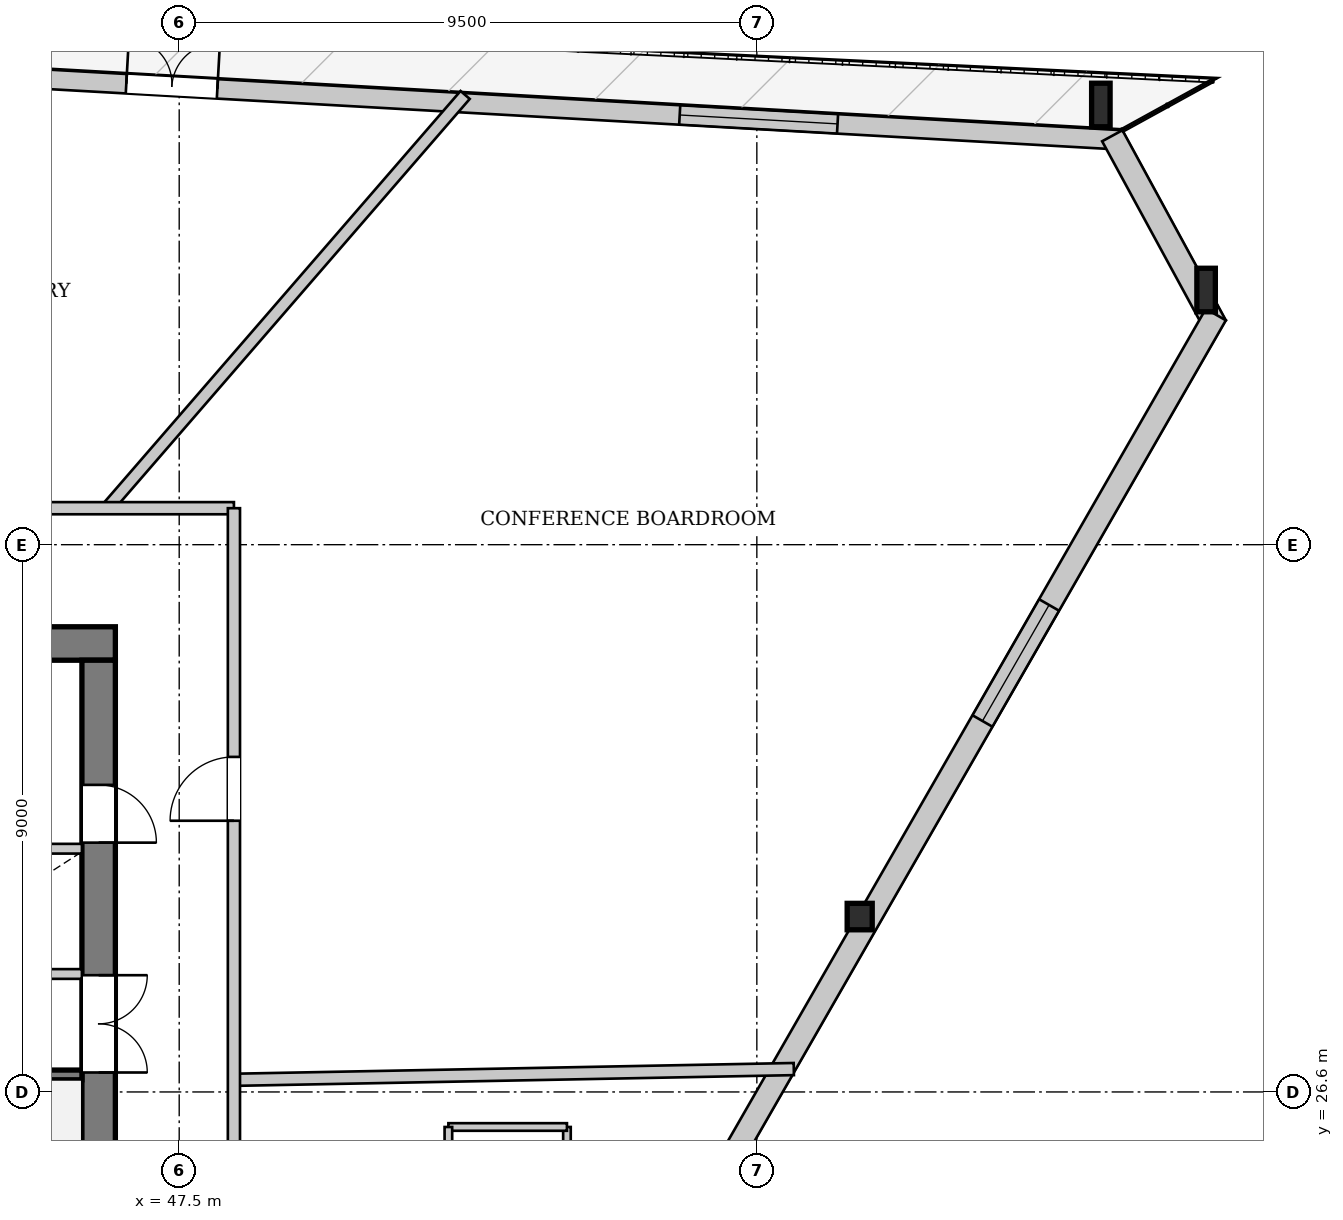
"""IFC4 building model, lengths in metres.
Left out: names, types, materials, properties, quantities, classifications, styles, units other than length and angle.
Written with IfcOpenShell. Run it as: python <this file> out.ifc"""

import sys

from ifc_helpers import new_model, si_unit, direction, frame, frame_2d, origin, origin_2d, place, context, subcontext, project, spatial, rectangle, i_section, extrude, source, transform, mapped, element, fill, save


model = new_model("IFC4")
c1 = context("Model", 3, precision=1e-05, world=origin(), true_north=direction((0.0, 1.0)))
c2 = subcontext(c1, "Body", "Model", "MODEL_VIEW")
j1 = project(units=[si_unit("LENGTHUNIT", "METRE"), si_unit("PLANEANGLEUNIT", "RADIAN")], contexts=[c1])
p1 = place(None, origin())
s1 = spatial("IfcSite", under=j1, at=p1, CompositionType="ELEMENT")
p2 = place(p1, origin())
s2 = spatial("IfcBuilding", under=s1, at=p2, CompositionType="ELEMENT")
p3 = place(p2, frame((0.0, 0.0, 157.25)))
s3 = spatial("IfcBuildingStorey", under=s2, at=p3, CompositionType="ELEMENT", Elevation=157.25)
m1 = source(origin(), c2, "Body", "SweptSolid", [
    extrude(i_section(OverallWidth=0.304, OverallDepth=0.716, WebThickness=0.021, FlangeThickness=0.04, at=origin_2d()), origin(), (0.0, 0.0, 1.0), 3.588),
])
p4 = place(p3, frame((64.713, 39.29, 0.0), z_axis=(-0.180999901235, 0.277759998813, 0.943444973919), x_axis=(-0.837814695631, -0.54595470122, 0.0)))
e1 = element("IfcColumn", 1, at=p4, inside=s3, PredefinedType="COLUMN", context=c2, shape_type="MappedRepresentation", body=[
    mapped(m1, transform((0.0, 0.0, 0.0), x_axis=(1.0, 0.0, 0.0), y_axis=(0.0, 1.0, 0.0), z_axis=(0.0, 0.0, 1.0), scale=1.0)),
])
m2 = source(origin(), c2, "Body", "SweptSolid", [
    extrude(i_section(OverallWidth=0.304, OverallDepth=0.716, WebThickness=0.021, FlangeThickness=0.04, at=origin_2d()), origin(), (0.0, 0.0, 1.0), 3.557),
])
p5 = place(p3, frame((63.012, 42.416, 0.0), z_axis=(-0.199467388464, 0.233444111551, 0.951691445649), x_axis=(-0.76026557105, -0.649612393259, 0.0)))
e2 = element("IfcColumn", 2, at=p5, inside=s3, PredefinedType="COLUMN", context=c2, shape_type="MappedRepresentation", body=[
    mapped(m2, transform((0.0, 0.0, 0.0), x_axis=(1.0, 0.0, 0.0), y_axis=(0.0, 1.0, 0.0), z_axis=(0.0, 0.0, 1.0), scale=1.0)),
])
m3 = source(origin(), c2, "Body", "SweptSolid", [
    extrude(i_section(OverallWidth=0.412, OverallDepth=0.435, WebThickness=0.031, FlangeThickness=0.05, at=origin_2d()), origin(), (0.0, 0.0, 1.0), 3.503),
])
p6 = place(p3, frame((58.838, 29.058, 0.0), z_axis=(-0.083352807672, 0.243576975596, 0.966293209338), x_axis=(-0.946135617904, -0.32377058627, 0.0)))
e3 = element("IfcColumn", 3, at=p6, inside=s3, PredefinedType="COLUMN", context=c2, shape_type="MappedRepresentation", body=[
    mapped(m3, transform((0.0, 0.0, 0.0), x_axis=(1.0, 0.0, 0.0), y_axis=(0.0, 1.0, 0.0), z_axis=(0.0, 0.0, 1.0), scale=1.0)),
])
p7 = place(p3, frame((40.027, 43.553, 0.0), z_axis=(0.0, 0.0, 1.0), x_axis=(0.998410901797, -0.056353093731, 0.0)))
e4 = element("IfcWall", 4, at=p7, inside=s3, PredefinedType="SOLIDWALL", context=c2, shape_type="SweptSolid", body=[
    extrude(rectangle(XDim=23.013, YDim=0.32, at=frame_2d((11.507, 0.0))), origin(), (0.0, 0.0, 1.0), 2.722),
])
p8 = place(p7, frame((6.614, 0.0, 0.0)))
e5 = element("IfcOpeningElement", 5, at=p8, cuts=e4, PredefinedType="OPENING", context=c2, shape_type="SweptSolid", body=[
    extrude(rectangle(XDim=1.5, YDim=2.3, at=frame_2d((0.75, 1.15))), frame((0.0, 0.17, 0.0), z_axis=(0.0, -1.0, 0.0), x_axis=(1.0, 0.0, 0.0)), (0.0, 0.0, 1.0), 0.34),
])
p9 = place(p7, frame((15.73, 0.0, 0.252)))
e6 = element("IfcOpeningElement", 6, at=p9, cuts=e4, PredefinedType="OPENING", context=c2, shape_type="SweptSolid", body=[
    extrude(rectangle(XDim=2.6, YDim=2.35, at=frame_2d((1.3, 1.175))), frame((0.0, 0.17, 0.0), z_axis=(0.0, -1.0, 0.0), x_axis=(1.0, 0.0, 0.0)), (0.0, 0.0, 1.0), 0.34),
])
p10 = place(p3, frame((62.846, 42.325, 0.0), z_axis=(0.0, 0.0, 1.0), x_axis=(0.477924257252, -0.878401049823, 0.0)))
e7 = element("IfcWall", 7, at=p10, inside=s3, PredefinedType="SOLIDWALL", context=c2, shape_type="SweptSolid", body=[
    extrude(rectangle(XDim=3.559, YDim=0.38, at=frame_2d((1.78, 0.0))), origin(), (0.0, 0.0, 1.0), 2.722),
])
p11 = place(p3, frame((64.549, 39.384, 0.0), z_axis=(0.0, 0.0, 1.0), x_axis=(-0.49798956696, -0.867183020589, 0.0)))
e8 = element("IfcWall", 8, at=p11, inside=s3, PredefinedType="SOLIDWALL", context=c2, shape_type="SweptSolid", body=[
    extrude(rectangle(XDim=23.598, YDim=0.38, at=frame_2d((11.799, 0.0))), origin(), (0.0, 0.0, 1.0), 2.722),
])
p12 = place(p11, frame((5.507, 0.0, 0.352)))
e9 = element("IfcOpeningElement", 9, at=p12, cuts=e8, PredefinedType="OPENING", context=c2, shape_type="SweptSolid", body=[
    extrude(rectangle(XDim=2.2, YDim=2.25, at=frame_2d((1.1, 1.125))), frame((0.0, 0.2, 0.0), z_axis=(0.0, -1.0, 0.0), x_axis=(1.0, 0.0, 0.0)), (0.0, 0.0, 1.0), 0.4),
])
p13 = place(p11, frame((15.891, 0.0, 0.352)))
e10 = element("IfcOpeningElement", 10, at=p13, cuts=e8, PredefinedType="OPENING", context=c2, shape_type="SweptSolid", body=[
    extrude(rectangle(XDim=2.2, YDim=2.25, at=frame_2d((1.1, 1.125))), frame((0.0, 0.2, 0.0), z_axis=(0.0, -1.0, 0.0), x_axis=(1.0, 0.0, 0.0)), (0.0, 0.0, 1.0), 0.4),
])
p14 = place(p3, frame((29.55, 33.975, 0.0), z_axis=(0.0, 0.0, 1.0), x_axis=(1.0, 0.0, 0.0)))
e11 = element("IfcWall", 11, at=p14, inside=s3, PredefinedType="SHEAR", context=c2, shape_type="SweptSolid", body=[
    extrude(rectangle(XDim=16.9, YDim=0.55, at=frame_2d((8.45, 0.0))), origin(), (0.0, 0.0, 1.0), 3.33),
])
p15 = place(p14, frame((1.55, 0.0, 0.0)))
e12 = element("IfcOpeningElement", 12, at=p15, cuts=e11, PredefinedType="OPENING", context=c2, shape_type="SweptSolid", body=[
    extrude(rectangle(XDim=0.95, YDim=2.1, at=frame_2d((0.475, 1.05))), frame((0.0, 0.285, 0.0), z_axis=(0.0, -1.0, 0.0), x_axis=(1.0, 0.0, 0.0)), (0.0, 0.0, 1.0), 0.57),
])
p16 = place(p14, frame((3.93, 0.0, 0.0)))
e13 = element("IfcOpeningElement", 13, at=p16, cuts=e11, PredefinedType="OPENING", context=c2, shape_type="SweptSolid", body=[
    extrude(rectangle(XDim=1.32, YDim=2.2, at=frame_2d((0.66, 1.1))), frame((0.0, 0.285, 0.0), z_axis=(0.0, -1.0, 0.0), x_axis=(1.0, 0.0, 0.0)), (0.0, 0.0, 1.0), 0.57),
])
p17 = place(p3, frame((46.175, 33.7, 0.0), z_axis=(0.0, 0.0, 1.0), x_axis=(0.0, -1.0, 0.0)))
e14 = element("IfcWall", 14, at=p17, inside=s3, PredefinedType="SHEAR", context=c2, shape_type="SweptSolid", body=[
    extrude(rectangle(XDim=14.2, YDim=0.55, at=frame_2d((7.1, 0.0))), origin(), (0.0, 0.0, 1.0), 3.33),
])
p18 = place(p17, frame((5.18, 0.0, 0.0)))
e15 = element("IfcOpeningElement", 15, at=p18, cuts=e14, PredefinedType="OPENING", context=c2, shape_type="SweptSolid", body=[
    extrude(rectangle(XDim=1.6, YDim=2.2, at=frame_2d((0.8, 1.1))), frame((0.0, 0.285, 0.0), z_axis=(0.0, -1.0, 0.0), x_axis=(1.0, 0.0, 0.0)), (0.0, 0.0, 1.0), 0.57),
])
p19 = place(p17, frame((2.05, 0.0, 0.0)))
e16 = element("IfcOpeningElement", 16, at=p19, cuts=e14, PredefinedType="OPENING", context=c2, shape_type="SweptSolid", body=[
    extrude(rectangle(XDim=0.95, YDim=2.1, at=frame_2d((0.475, 1.05))), frame((0.0, 0.285, 0.0), z_axis=(0.0, -1.0, 0.0), x_axis=(1.0, 0.0, 0.0)), (0.0, 0.0, 1.0), 0.57),
])
p20 = place(p3, frame((42.88, 26.88, 0.0), z_axis=(0.0, 0.0, 1.0), x_axis=(1.0, 0.0, 0.0)))
e17 = element("IfcWall", 17, at=p20, inside=s3, PredefinedType="PARTITIONING", context=c2, shape_type="SweptSolid", body=[
    extrude(rectangle(XDim=3.02, YDim=0.16, at=frame_2d((1.51, 0.0))), origin(), (0.0, 0.0, 1.0), 3.33),
])
p21 = place(p3, frame((33.28, 28.54, 0.0), z_axis=(0.0, 0.0, 1.0), x_axis=(1.0, 0.0, 0.0)))
e18 = element("IfcWall", 18, at=p21, inside=s3, PredefinedType="PARTITIONING", context=c2, shape_type="SweptSolid", body=[
    extrude(rectangle(XDim=12.62, YDim=0.16, at=frame_2d((6.31, 0.0))), origin(), (0.0, 0.0, 1.0), 3.33),
])
p22 = place(p21, frame((0.26, 0.0, 0.0)))
e19 = element("IfcOpeningElement", 19, at=p22, cuts=e18, PredefinedType="OPENING", context=c2, shape_type="SweptSolid", body=[
    extrude(rectangle(XDim=1.1, YDim=2.2, at=frame_2d((0.55, 1.1))), frame((0.0, 0.09, 0.0), z_axis=(0.0, -1.0, 0.0), x_axis=(1.0, 0.0, 0.0)), (0.0, 0.0, 1.0), 0.18),
])
p23 = place(p21, frame((2.01, 0.0, 0.0)))
e20 = element("IfcOpeningElement", 20, at=p23, cuts=e18, PredefinedType="OPENING", context=c2, shape_type="SweptSolid", body=[
    extrude(rectangle(XDim=1.1, YDim=2.2, at=frame_2d((0.55, 1.1))), frame((0.0, 0.09, 0.0), z_axis=(0.0, -1.0, 0.0), x_axis=(1.0, 0.0, 0.0)), (0.0, 0.0, 1.0), 0.18),
])
p24 = place(p21, frame((3.76, 0.0, 0.0)))
e21 = element("IfcOpeningElement", 21, at=p24, cuts=e18, PredefinedType="OPENING", context=c2, shape_type="SweptSolid", body=[
    extrude(rectangle(XDim=1.1, YDim=2.2, at=frame_2d((0.55, 1.1))), frame((0.0, 0.09, 0.0), z_axis=(0.0, -1.0, 0.0), x_axis=(1.0, 0.0, 0.0)), (0.0, 0.0, 1.0), 0.18),
])
p25 = place(p3, frame((40.72, 30.6, 0.0), z_axis=(0.0, 0.0, 1.0), x_axis=(1.0, 0.0, 0.0)))
e22 = element("IfcWall", 22, at=p25, inside=s3, PredefinedType="PARTITIONING", context=c2, shape_type="SweptSolid", body=[
    extrude(rectangle(XDim=5.18, YDim=0.16, at=frame_2d((2.59, 0.0))), origin(), (0.0, 0.0, 1.0), 3.33),
])
p26 = place(p3, frame((48.4, 26.8, 0.0), z_axis=(0.0, 0.0, 1.0), x_axis=(0.999815805831, 0.019192561338, 0.0)))
e23 = element("IfcWall", 23, at=p26, inside=s3, PredefinedType="PARTITIONING", context=c2, shape_type="SweptSolid", body=[
    extrude(rectangle(XDim=9.21, YDim=0.2, at=frame_2d((4.605, 0.0))), origin(), (0.0, 0.0, 1.0), 3.33),
])
p27 = place(p3, frame((46.316, 36.2, 0.0), z_axis=(0.0, 0.0, 1.0), x_axis=(0.654736166115, 0.755857495022, 0.0)))
e24 = element("IfcWall", 24, at=p27, inside=s3, PredefinedType="PARTITIONING", context=c2, shape_type="SweptSolid", body=[
    extrude(rectangle(XDim=8.991, YDim=0.2, at=frame_2d((4.496, 0.0))), origin(), (0.0, 0.0, 1.0), 3.33),
])
p28 = place(p3, frame((53.877, 23.624, 0.0), z_axis=(0.0, 0.0, 1.0), x_axis=(0.0, 1.0, 0.0)))
e25 = element("IfcWall", 25, at=p28, inside=s3, PredefinedType="PARTITIONING", context=c2, shape_type="SweptSolid", body=[
    extrude(rectangle(XDim=2.4, YDim=0.125, at=frame_2d((1.2, 0.0))), origin(), (0.0, 0.0, 1.0), 3.33),
])
p29 = place(p28, frame((0.75, 0.0, 0.0)))
e26 = element("IfcOpeningElement", 26, at=p29, cuts=e25, PredefinedType="OPENING", context=c2, shape_type="SweptSolid", body=[
    extrude(rectangle(XDim=0.9, YDim=2.1, at=frame_2d((0.45, 1.05))), frame((0.0, 0.073, 0.0), z_axis=(0.0, -1.0, 0.0), x_axis=(1.0, 0.0, 0.0)), (0.0, 0.0, 1.0), 0.145),
])
p30 = place(p3, frame((53.877, 26.024, 0.0), z_axis=(0.0, 0.0, 1.0), x_axis=(-1.0, 0.0, 0.0)))
e27 = element("IfcWall", 27, at=p30, inside=s3, PredefinedType="PARTITIONING", context=c2, shape_type="SweptSolid", body=[
    extrude(rectangle(XDim=1.95, YDim=0.125, at=frame_2d((0.975, 0.0))), origin(), (0.0, 0.0, 1.0), 3.33),
])
p31 = place(p3, frame((51.927, 26.024, 0.0), z_axis=(0.0, 0.0, 1.0), x_axis=(0.0, -1.0, 0.0)))
e28 = element("IfcWall", 28, at=p31, inside=s3, PredefinedType="PARTITIONING", context=c2, shape_type="SweptSolid", body=[
    extrude(rectangle(XDim=2.4, YDim=0.125, at=frame_2d((1.2, 0.0))), origin(), (0.0, 0.0, 1.0), 3.33),
])
p32 = place(p3, frame((43.4, 36.2, 0.0), z_axis=(0.0, 0.0, 1.0), x_axis=(1.0, 0.0, 0.0)))
e29 = element("IfcWall", 29, at=p32, inside=s3, PredefinedType="PARTITIONING", context=c2, shape_type="SweptSolid", body=[
    extrude(rectangle(XDim=5.0, YDim=0.2, at=frame_2d((2.5, 0.0))), origin(), (0.0, 0.0, 1.0), 3.33),
])
p33 = place(p3, frame((48.4, 17.0, 0.0), z_axis=(0.0, 0.0, 1.0), x_axis=(0.0, 1.0, 0.0)))
e30 = element("IfcWall", 30, at=p33, inside=s3, PredefinedType="PARTITIONING", context=c2, shape_type="SweptSolid", body=[
    extrude(rectangle(XDim=19.2, YDim=0.2, at=frame_2d((9.6, 0.0))), origin(), (0.0, 0.0, 1.0), 3.33),
])
p34 = place(p33, frame((3.765, 0.0, 0.0)))
e31 = element("IfcOpeningElement", 31, at=p34, cuts=e30, PredefinedType="OPENING", context=c2, shape_type="SweptSolid", body=[
    extrude(rectangle(XDim=1.05, YDim=2.2, at=frame_2d((0.525, 1.1))), frame((0.0, 0.11, 0.0), z_axis=(0.0, -1.0, 0.0), x_axis=(1.0, 0.0, 0.0)), (0.0, 0.0, 1.0), 0.22),
])
p35 = place(p33, frame((14.06, 0.0, 0.0)))
e32 = element("IfcOpeningElement", 32, at=p35, cuts=e30, PredefinedType="OPENING", context=c2, shape_type="SweptSolid", body=[
    extrude(rectangle(XDim=1.05, YDim=2.2, at=frame_2d((0.525, 1.1))), frame((0.0, 0.11, 0.0), z_axis=(0.0, -1.0, 0.0), x_axis=(1.0, 0.0, 0.0)), (0.0, 0.0, 1.0), 0.22),
])
m4 = source(origin(), c2, "Body", "SweptSolid", [
    extrude(rectangle(XDim=1.5, YDim=2.3, at=frame_2d((0.75, 1.15))), frame((0.0, 0.025, 0.0), z_axis=(0.0, -1.0, 0.0), x_axis=(1.0, 0.0, 0.0)), (0.0, 0.0, 1.0), 0.05),
])
p36 = place(p8, origin())
e33 = element("IfcDoor", 33, at=p36, inside=s3, OperationType="DOUBLE_DOOR_SINGLE_SWING", PredefinedType="DOOR", context=c2, shape_type="MappedRepresentation", body=[
    mapped(m4, transform((0.0, 0.0, 0.0), x_axis=(1.0, 0.0, 0.0), y_axis=(0.0, 1.0, 0.0), z_axis=(0.0, 0.0, 1.0), scale=1.0)),
])
fill(e5, e33)
m5 = source(origin(), c2, "Body", "SweptSolid", [
    extrude(rectangle(XDim=2.6, YDim=2.35, at=frame_2d((1.3, 1.175))), frame((0.0, 0.03, 0.0), z_axis=(0.0, -1.0, 0.0), x_axis=(1.0, 0.0, 0.0)), (0.0, 0.0, 1.0), 0.06),
])
p37 = place(p9, origin())
e34 = element("IfcWindow", 34, at=p37, inside=s3, PartitioningType="SINGLE_PANEL", PredefinedType="WINDOW", context=c2, shape_type="MappedRepresentation", body=[
    mapped(m5, transform((0.0, 0.0, 0.0), x_axis=(1.0, 0.0, 0.0), y_axis=(0.0, 1.0, 0.0), z_axis=(0.0, 0.0, 1.0), scale=1.0)),
])
fill(e6, e34)
m6 = source(origin(), c2, "Body", "SweptSolid", [
    extrude(rectangle(XDim=2.2, YDim=2.25, at=frame_2d((1.1, 1.125))), frame((0.0, 0.03, 0.0), z_axis=(0.0, -1.0, 0.0), x_axis=(1.0, 0.0, 0.0)), (0.0, 0.0, 1.0), 0.06),
])
p38 = place(p12, origin())
e35 = element("IfcWindow", 35, at=p38, inside=s3, PartitioningType="SINGLE_PANEL", PredefinedType="WINDOW", context=c2, shape_type="MappedRepresentation", body=[
    mapped(m6, transform((0.0, 0.0, 0.0), x_axis=(1.0, 0.0, 0.0), y_axis=(0.0, 1.0, 0.0), z_axis=(0.0, 0.0, 1.0), scale=1.0)),
])
fill(e9, e35)
m7 = source(origin(), c2, "Body", "SweptSolid", [
    extrude(rectangle(XDim=1.6, YDim=2.2, at=frame_2d((0.8, 1.1))), frame((0.0, 0.025, 0.0), z_axis=(0.0, -1.0, 0.0), x_axis=(1.0, 0.0, 0.0)), (0.0, 0.0, 1.0), 0.05),
])
p39 = place(p18, origin())
e36 = element("IfcDoor", 36, at=p39, inside=s3, OperationType="DOUBLE_DOOR_SINGLE_SWING", PredefinedType="DOOR", context=c2, shape_type="MappedRepresentation", body=[
    mapped(m7, transform((0.0, 0.0, 0.0), x_axis=(1.0, 0.0, 0.0), y_axis=(0.0, 1.0, 0.0), z_axis=(0.0, 0.0, 1.0), scale=1.0)),
])
fill(e15, e36)
m8 = source(origin(), c2, "Body", "SweptSolid", [
    extrude(rectangle(XDim=0.95, YDim=2.1, at=frame_2d((0.475, 1.05))), frame((0.0, 0.025, 0.0), z_axis=(0.0, -1.0, 0.0), x_axis=(1.0, 0.0, 0.0)), (0.0, 0.0, 1.0), 0.05),
])
p40 = place(p19, origin())
e37 = element("IfcDoor", 37, at=p40, inside=s3, OperationType="SINGLE_SWING_RIGHT", PredefinedType="DOOR", context=c2, shape_type="MappedRepresentation", body=[
    mapped(m8, transform((0.0, 0.0, 0.0), x_axis=(1.0, 0.0, 0.0), y_axis=(0.0, 1.0, 0.0), z_axis=(0.0, 0.0, 1.0), scale=1.0)),
])
fill(e16, e37)
m9 = source(origin(), c2, "Body", "SweptSolid", [
    extrude(rectangle(XDim=1.05, YDim=2.2, at=frame_2d((0.525, 1.1))), frame((0.0, 0.025, 0.0), z_axis=(0.0, -1.0, 0.0), x_axis=(1.0, 0.0, 0.0)), (0.0, 0.0, 1.0), 0.05),
])
p41 = place(p35, origin())
e38 = element("IfcDoor", 38, at=p41, inside=s3, OperationType="SINGLE_SWING_LEFT", PredefinedType="DOOR", context=c2, shape_type="MappedRepresentation", body=[
    mapped(m9, transform((0.0, 0.0, 0.0), x_axis=(1.0, 0.0, 0.0), y_axis=(0.0, 1.0, 0.0), z_axis=(0.0, 0.0, 1.0), scale=1.0)),
])
fill(e32, e38)
save(model, sys.argv[1])
